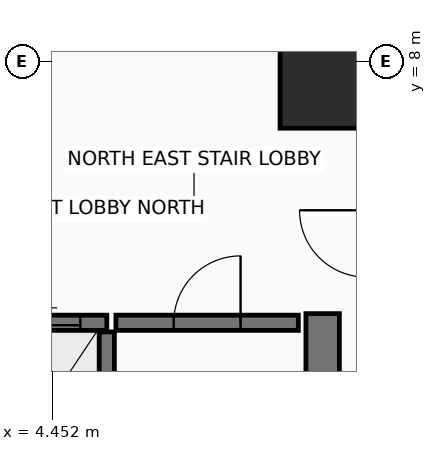
"""IFC4 building model, lengths in metres.
Left out: names, types, materials, properties, quantities, classifications, styles, units other than length and angle.
Written with IfcOpenShell. Run it as: python <this file> out.ifc"""

import sys

from ifc_helpers import new_model, si_unit, direction, frame, frame_2d, origin, origin_2d, place, context, subcontext, project, spatial, rectangle, extrude, element, fill, save


model = new_model("IFC4")
c1 = context("Model", 3, precision=1e-05, world=origin(), true_north=direction((0.0, 1.0)))
c2 = subcontext(c1, "Body", "Model", "MODEL_VIEW")
j1 = project(units=[si_unit("LENGTHUNIT", "METRE"), si_unit("PLANEANGLEUNIT", "RADIAN")], contexts=[c1])
p1 = place(None, origin())
s1 = spatial("IfcSite", under=j1, at=p1, CompositionType="ELEMENT")
p2 = place(p1, origin())
s2 = spatial("IfcBuilding", under=s1, at=p2, CompositionType="ELEMENT")
p3 = place(p2, frame((0.0, 0.0, 70.75)))
s3 = spatial("IfcBuildingStorey", under=s2, at=p3, CompositionType="ELEMENT", Elevation=70.75)
p4 = place(p3, frame((8.9, 7.6, 0.0), z_axis=(0.0, 0.0, 1.0), x_axis=(1.0, 0.0, 0.0)))
e1 = element("IfcColumn", 1, at=p4, inside=s3, PredefinedType="COLUMN", context=c2, shape_type="SweptSolid", body=[
    extrude(rectangle(XDim=1.4, YDim=1.4, at=origin_2d()), origin(), (0.0, 0.0, 1.0), 3.45),
])
p5 = place(p3, frame((8.9, -6.85, 0.0), z_axis=(0.0, 0.0, 1.0), x_axis=(0.0, 1.0, 0.0)))
e2 = element("IfcWall", 2, at=p5, inside=s3, PredefinedType="SHEAR", context=c2, shape_type="SweptSolid", body=[
    extrude(rectangle(XDim=10.7, YDim=0.55, at=frame_2d((5.35, 0.0))), origin(), (0.0, 0.0, 1.0), 3.275),
])
p6 = place(p3, frame((5.35, -3.75, 0.0), z_axis=(0.0, 0.0, 1.0), x_axis=(0.0, 1.0, 0.0)))
e3 = element("IfcWall", 3, at=p6, inside=s3, PredefinedType="SHEAR", context=c2, shape_type="SweptSolid", body=[
    extrude(rectangle(XDim=7.3, YDim=0.25, at=frame_2d((3.65, 0.0))), origin(), (0.0, 0.0, 1.0), 3.275),
])
p7 = place(p3, frame((5.5, 3.7, 0.0), z_axis=(0.0, 0.0, 1.0), x_axis=(1.0, 0.0, 0.0)))
e4 = element("IfcWall", 4, at=p7, inside=s3, PredefinedType="SHEAR", context=c2, shape_type="SweptSolid", body=[
    extrude(rectangle(XDim=3.0, YDim=0.25, at=frame_2d((1.5, 0.0))), origin(), (0.0, 0.0, 1.0), 3.275),
])
p8 = place(p7, frame((0.95, 0.0, 0.0)))
e5 = element("IfcOpeningElement", 5, at=p8, cuts=e4, PredefinedType="OPENING", context=c2, shape_type="SweptSolid", body=[
    extrude(rectangle(XDim=1.1, YDim=2.15, at=frame_2d((0.55, 1.075))), frame((0.0, 0.135, 0.0), z_axis=(0.0, -1.0, 0.0), x_axis=(1.0, 0.0, 0.0)), (0.0, 0.0, 1.0), 0.27),
])
p9 = place(p3, frame((3.28, 3.7, 0.0), z_axis=(0.0, 0.0, 1.0), x_axis=(1.0, 0.0, 0.0)))
e6 = element("IfcWall", 6, at=p9, inside=s3, PredefinedType="SHEAR", context=c2, shape_type="SweptSolid", body=[
    extrude(rectangle(XDim=2.07, YDim=0.25, at=frame_2d((1.035, 0.0))), origin(), (0.0, 0.0, 1.0), 3.275),
])
p10 = place(p9, frame((0.435, 0.0, 0.0)))
e7 = element("IfcOpeningElement", 7, at=p10, cuts=e6, PredefinedType="OPENING", context=c2, shape_type="SweptSolid", body=[
    extrude(rectangle(XDim=1.2, YDim=2.2, at=frame_2d((0.6, 1.1))), frame((0.0, 0.135, 0.0), z_axis=(0.0, -1.0, 0.0), x_axis=(1.0, 0.0, 0.0)), (0.0, 0.0, 1.0), 0.27),
])
p11 = place(p8, frame((1.1, 0.0, 0.0), z_axis=(0.0, 0.0, 1.0), x_axis=(-1.0, 0.0, 0.0)))
e8 = element("IfcDoor", 8, at=p11, inside=s3, OperationType="SINGLE_SWING_LEFT", PredefinedType="DOOR", context=c2, shape_type="SweptSolid", body=[
    extrude(rectangle(XDim=1.1, YDim=2.15, at=frame_2d((0.55, 1.075))), frame((0.0, 0.025, 0.0), z_axis=(0.0, -1.0, 0.0), x_axis=(1.0, 0.0, 0.0)), (0.0, 0.0, 1.0), 0.05),
])
fill(e5, e8)
p12 = place(p10, origin())
e9 = element("IfcDoor", 9, at=p12, inside=s3, OperationType="SLIDING_TO_RIGHT", PredefinedType="DOOR", context=c2, shape_type="SweptSolid", body=[
    extrude(rectangle(XDim=1.2, YDim=2.2, at=frame_2d((0.6, 1.1))), frame((0.0, 0.025, 0.0), z_axis=(0.0, -1.0, 0.0), x_axis=(1.0, 0.0, 0.0)), (0.0, 0.0, 1.0), 0.05),
])
fill(e7, e9)
save(model, sys.argv[1])
